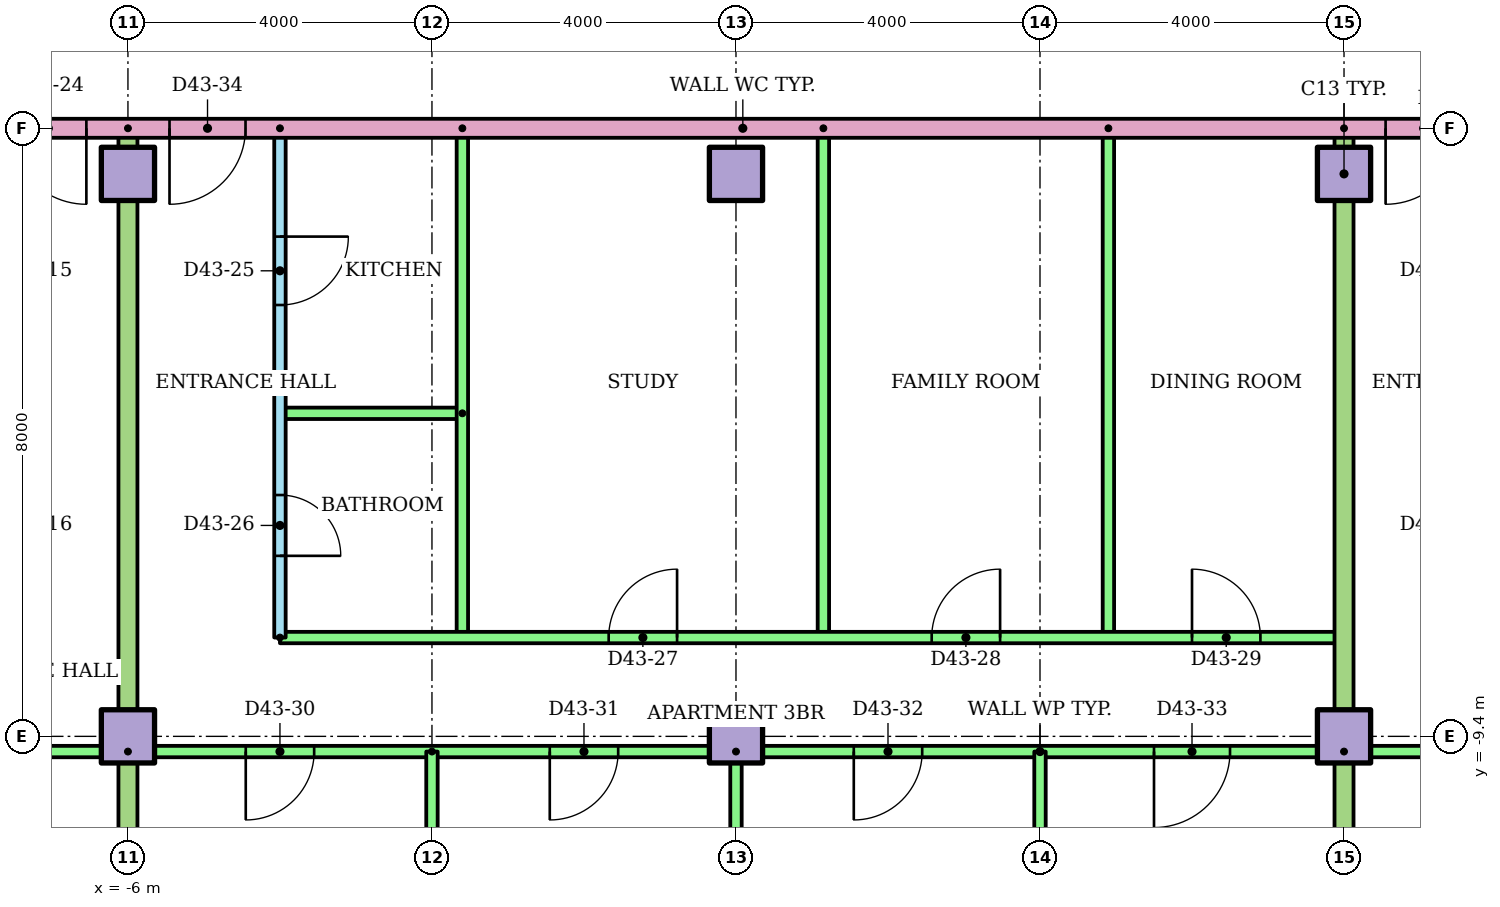
"""IFC4 building model, lengths in metres.
Left out: names, types, materials, properties, quantities, classifications, styles, units other than length and angle.
Written with IfcOpenShell. Run it as: python <this file> out.ifc"""

import sys

from ifc_helpers import new_model, si_unit, direction, frame, frame_2d, origin, origin_2d, place, context, subcontext, project, spatial, rectangle, extrude, element, fill, save


model = new_model("IFC4")
c1 = context("Model", 3, precision=1e-05, world=origin(), true_north=direction((0.0, 1.0)))
c2 = subcontext(c1, "Body", "Model", "MODEL_VIEW")
j1 = project(units=[si_unit("LENGTHUNIT", "METRE"), si_unit("PLANEANGLEUNIT", "RADIAN")], contexts=[c1])
p1 = place(None, origin())
s1 = spatial("IfcSite", under=j1, at=p1, CompositionType="ELEMENT")
p2 = place(p1, origin())
s2 = spatial("IfcBuilding", under=s1, at=p2, CompositionType="ELEMENT")
p3 = place(p2, frame((0.0, 0.0, 168.5)))
s3 = spatial("IfcBuildingStorey", under=s2, at=p3, CompositionType="ELEMENT", Elevation=168.5)
for number, where in (
    (1, (-6.0, -9.4, 0.0)),
    (2, (2.0, -9.4, 0.0)),
    (3, (10.0, -9.4, 0.0)),
    (4, (-6.0, -2.0, 0.0)),
    (5, (2.0, -2.0, 0.0)),
    (6, (10.0, -2.0, 0.0)),
):
    element("IfcColumn", number, at=place(p3, frame(where)), inside=s3, PredefinedType="COLUMN", context=c2, shape_type="SweptSolid", body=[
        extrude(rectangle(XDim=0.7, YDim=0.7, at=origin_2d()), origin(), (0.0, 0.0, 1.0), 3.2),
    ])
p4 = place(p3, frame((-6.0, -9.6, 0.0), z_axis=(0.0, 0.0, 1.0), x_axis=(-1.0, 0.0, 0.0)))
e7 = element("IfcWall", 7, at=p4, inside=s3, PredefinedType="PARTITIONING", context=c2, shape_type="SweptSolid", body=[
    extrude(rectangle(XDim=18.82, YDim=0.15, at=frame_2d((9.41, 0.0))), origin(), (0.0, 0.0, 1.0), 2.4),
])
p5 = place(p4, frame((16.547, 0.0, 0.0)))
e8 = element("IfcOpeningElement", 8, at=p5, cuts=e7, PredefinedType="OPENING", context=c2, shape_type="SweptSolid", body=[
    extrude(rectangle(XDim=0.9, YDim=2.1, at=frame_2d((0.45, 1.05))), frame((0.0, 0.085, 0.0), z_axis=(0.0, -1.0, 0.0), x_axis=(1.0, 0.0, 0.0)), (0.0, 0.0, 1.0), 0.17),
])
p6 = place(p4, frame((10.45, 0.0, 0.0)))
e9 = element("IfcOpeningElement", 9, at=p6, cuts=e7, PredefinedType="OPENING", context=c2, shape_type="SweptSolid", body=[
    extrude(rectangle(XDim=0.9, YDim=2.1, at=frame_2d((0.45, 1.05))), frame((0.0, 0.085, 0.0), z_axis=(0.0, -1.0, 0.0), x_axis=(1.0, 0.0, 0.0)), (0.0, 0.0, 1.0), 0.17),
])
p7 = place(p4, frame((3.5, 0.0, 0.0)))
e10 = element("IfcOpeningElement", 10, at=p7, cuts=e7, PredefinedType="OPENING", context=c2, shape_type="SweptSolid", body=[
    extrude(rectangle(XDim=1.0, YDim=2.1, at=frame_2d((0.5, 1.05))), frame((0.0, 0.085, 0.0), z_axis=(0.0, -1.0, 0.0), x_axis=(1.0, 0.0, 0.0)), (0.0, 0.0, 1.0), 0.17),
])
p8 = place(p3, frame((-4.0, -1.4, 0.0), z_axis=(0.0, 0.0, 1.0), x_axis=(0.0, -1.0, 0.0)))
e11 = element("IfcWall", 11, at=p8, inside=s3, PredefinedType="PARTITIONING", context=c2, shape_type="SweptSolid", body=[
    extrude(rectangle(XDim=6.7, YDim=0.15, at=frame_2d((3.35, 0.0))), origin(), (0.0, 0.0, 1.0), 2.4),
])
p9 = place(p8, frame((1.425, 0.0, 0.0)))
e12 = element("IfcOpeningElement", 12, at=p9, cuts=e11, PredefinedType="OPENING", context=c2, shape_type="SweptSolid", body=[
    extrude(rectangle(XDim=0.9, YDim=2.1, at=frame_2d((0.45, 1.05))), frame((0.0, 0.085, 0.0), z_axis=(0.0, -1.0, 0.0), x_axis=(1.0, 0.0, 0.0)), (0.0, 0.0, 1.0), 0.17),
])
p10 = place(p8, frame((4.825, 0.0, 0.0)))
e13 = element("IfcOpeningElement", 13, at=p10, cuts=e11, PredefinedType="OPENING", context=c2, shape_type="SweptSolid", body=[
    extrude(rectangle(XDim=0.8, YDim=2.1, at=frame_2d((0.4, 1.05))), frame((0.0, 0.085, 0.0), z_axis=(0.0, -1.0, 0.0), x_axis=(1.0, 0.0, 0.0)), (0.0, 0.0, 1.0), 0.17),
])
p11 = place(p3, frame((-1.6, -5.15, 0.0), z_axis=(0.0, 0.0, 1.0), x_axis=(-1.0, 0.0, 0.0)))
e14 = element("IfcWall", 14, at=p11, inside=s3, PredefinedType="PARTITIONING", context=c2, shape_type="SweptSolid", body=[
    extrude(rectangle(XDim=2.4, YDim=0.15, at=frame_2d((1.2, 0.0))), origin(), (0.0, 0.0, 1.0), 2.4),
])
for number, where, z_axis, x_axis in (
    (15, (-1.6, -1.4, 0.0), (0.0, 0.0, 1.0), (0.0, -1.0, 0.0)),
    (16, (3.15, -1.4, 0.0), (0.0, 0.0, 1.0), (0.0, -1.0, 0.0)),
    (17, (6.9, -1.4, 0.0), (0.0, 0.0, 1.0), (0.0, -1.0, 0.0)),
):
    element("IfcWall", number, at=place(p3, frame(where, z_axis=z_axis, x_axis=x_axis)), inside=s3, PredefinedType="PARTITIONING", context=c2, shape_type="SweptSolid", body=[
        extrude(rectangle(XDim=6.7, YDim=0.15, at=frame_2d((3.35, 0.0))), origin(), (0.0, 0.0, 1.0), 2.4),
    ])
p12 = place(p3, frame((-4.0, -8.1, 0.0)))
e18 = element("IfcWall", 18, at=p12, inside=s3, PredefinedType="PARTITIONING", context=c2, shape_type="SweptSolid", body=[
    extrude(rectangle(XDim=14.0, YDim=0.15, at=frame_2d((7.0, 0.0))), origin(), (0.0, 0.0, 1.0), 2.4),
])
p13 = place(p12, frame((4.325, 0.0, 0.0)))
e19 = element("IfcOpeningElement", 19, at=p13, cuts=e18, PredefinedType="OPENING", context=c2, shape_type="SweptSolid", body=[
    extrude(rectangle(XDim=0.9, YDim=2.1, at=frame_2d((0.45, 1.05))), frame((0.0, 0.085, 0.0), z_axis=(0.0, -1.0, 0.0), x_axis=(1.0, 0.0, 0.0)), (0.0, 0.0, 1.0), 0.17),
])
p14 = place(p12, frame((8.575, 0.0, 0.0)))
e20 = element("IfcOpeningElement", 20, at=p14, cuts=e18, PredefinedType="OPENING", context=c2, shape_type="SweptSolid", body=[
    extrude(rectangle(XDim=0.9, YDim=2.1, at=frame_2d((0.45, 1.05))), frame((0.0, 0.085, 0.0), z_axis=(0.0, -1.0, 0.0), x_axis=(1.0, 0.0, 0.0)), (0.0, 0.0, 1.0), 0.17),
])
p15 = place(p12, frame((12.0, 0.0, 0.0)))
e21 = element("IfcOpeningElement", 21, at=p15, cuts=e18, PredefinedType="OPENING", context=c2, shape_type="SweptSolid", body=[
    extrude(rectangle(XDim=0.9, YDim=2.1, at=frame_2d((0.45, 1.05))), frame((0.0, 0.085, 0.0), z_axis=(0.0, -1.0, 0.0), x_axis=(1.0, 0.0, 0.0)), (0.0, 0.0, 1.0), 0.17),
])
p16 = place(p3, frame((10.0, -9.6, 0.0), z_axis=(0.0, 0.0, 1.0), x_axis=(-1.0, 0.0, 0.0)))
e22 = element("IfcWall", 22, at=p16, inside=s3, PredefinedType="PARTITIONING", context=c2, shape_type="SweptSolid", body=[
    extrude(rectangle(XDim=16.0, YDim=0.15, at=frame_2d((8.0, 0.0))), origin(), (0.0, 0.0, 1.0), 2.4),
])
p17 = place(p16, frame((13.55, 0.0, 0.0)))
e23 = element("IfcOpeningElement", 23, at=p17, cuts=e22, PredefinedType="OPENING", context=c2, shape_type="SweptSolid", body=[
    extrude(rectangle(XDim=0.9, YDim=2.1, at=frame_2d((0.45, 1.05))), frame((0.0, 0.085, 0.0), z_axis=(0.0, -1.0, 0.0), x_axis=(1.0, 0.0, 0.0)), (0.0, 0.0, 1.0), 0.17),
])
p18 = place(p16, frame((9.55, 0.0, 0.0)))
e24 = element("IfcOpeningElement", 24, at=p18, cuts=e22, PredefinedType="OPENING", context=c2, shape_type="SweptSolid", body=[
    extrude(rectangle(XDim=0.9, YDim=2.1, at=frame_2d((0.45, 1.05))), frame((0.0, 0.085, 0.0), z_axis=(0.0, -1.0, 0.0), x_axis=(1.0, 0.0, 0.0)), (0.0, 0.0, 1.0), 0.17),
])
p19 = place(p16, frame((5.55, 0.0, 0.0)))
e25 = element("IfcOpeningElement", 25, at=p19, cuts=e22, PredefinedType="OPENING", context=c2, shape_type="SweptSolid", body=[
    extrude(rectangle(XDim=0.9, YDim=2.1, at=frame_2d((0.45, 1.05))), frame((0.0, 0.085, 0.0), z_axis=(0.0, -1.0, 0.0), x_axis=(1.0, 0.0, 0.0)), (0.0, 0.0, 1.0), 0.17),
])
p20 = place(p16, frame((1.5, 0.0, 0.0)))
e26 = element("IfcOpeningElement", 26, at=p20, cuts=e22, PredefinedType="OPENING", context=c2, shape_type="SweptSolid", body=[
    extrude(rectangle(XDim=1.0, YDim=2.1, at=frame_2d((0.5, 1.05))), frame((0.0, 0.085, 0.0), z_axis=(0.0, -1.0, 0.0), x_axis=(1.0, 0.0, 0.0)), (0.0, 0.0, 1.0), 0.17),
])
p21 = place(p3, frame((-2.0, -9.6, 0.0), z_axis=(0.0, 0.0, 1.0), x_axis=(0.0, -1.0, 0.0)))
e27 = element("IfcWall", 27, at=p21, inside=s3, PredefinedType="PARTITIONING", context=c2, shape_type="SweptSolid", body=[
    extrude(rectangle(XDim=6.821, YDim=0.15, at=frame_2d((3.41, 0.0))), origin(), (0.0, 0.0, 1.0), 2.4),
])
p22 = place(p3, frame((2.0, -9.6, 0.0), z_axis=(0.0, 0.0, 1.0), x_axis=(0.0, -1.0, 0.0)))
e28 = element("IfcWall", 28, at=p22, inside=s3, PredefinedType="PARTITIONING", context=c2, shape_type="SweptSolid", body=[
    extrude(rectangle(XDim=6.81, YDim=0.15, at=frame_2d((3.405, 0.0))), origin(), (0.0, 0.0, 1.0), 2.4),
])
p23 = place(p3, frame((6.0, -9.6, 0.0), z_axis=(0.0, 0.0, 1.0), x_axis=(0.0, -1.0, 0.0)))
e29 = element("IfcWall", 29, at=p23, inside=s3, PredefinedType="PARTITIONING", context=c2, shape_type="SweptSolid", body=[
    extrude(rectangle(XDim=6.821, YDim=0.15, at=frame_2d((3.41, 0.0))), origin(), (0.0, 0.0, 1.0), 2.4),
])
p24 = place(p3, frame((-6.0, -1.4, 0.0), z_axis=(0.0, 0.0, 1.0), x_axis=(0.0, -1.0, 0.0)))
e30 = element("IfcWall", 30, at=p24, inside=s3, PredefinedType="PARTITIONING", context=c2, shape_type="SweptSolid", body=[
    extrude(rectangle(XDim=15.01, YDim=0.25, at=frame_2d((7.505, 0.0))), origin(), (0.0, 0.0, 1.0), 2.4),
])
p25 = place(p3, frame((36.82, -9.6, 0.0), z_axis=(0.0, 0.0, 1.0), x_axis=(-1.0, 0.0, 0.0)))
e31 = element("IfcWall", 31, at=p25, inside=s3, PredefinedType="PARTITIONING", context=c2, shape_type="SweptSolid", body=[
    extrude(rectangle(XDim=26.82, YDim=0.15, at=frame_2d((13.41, 0.0))), origin(), (0.0, 0.0, 1.0), 2.4),
])
p26 = place(p25, frame((24.37, 0.0, 0.0)))
e32 = element("IfcOpeningElement", 32, at=p26, cuts=e31, PredefinedType="OPENING", context=c2, shape_type="SweptSolid", body=[
    extrude(rectangle(XDim=0.9, YDim=2.1, at=frame_2d((0.45, 1.05))), frame((0.0, 0.085, 0.0), z_axis=(0.0, -1.0, 0.0), x_axis=(1.0, 0.0, 0.0)), (0.0, 0.0, 1.0), 0.17),
])
p27 = place(p25, frame((20.37, 0.0, 0.0)))
e33 = element("IfcOpeningElement", 33, at=p27, cuts=e31, PredefinedType="OPENING", context=c2, shape_type="SweptSolid", body=[
    extrude(rectangle(XDim=0.9, YDim=2.1, at=frame_2d((0.45, 1.05))), frame((0.0, 0.085, 0.0), z_axis=(0.0, -1.0, 0.0), x_axis=(1.0, 0.0, 0.0)), (0.0, 0.0, 1.0), 0.17),
])
p28 = place(p25, frame((16.37, 0.0, 0.0)))
e34 = element("IfcOpeningElement", 34, at=p28, cuts=e31, PredefinedType="OPENING", context=c2, shape_type="SweptSolid", body=[
    extrude(rectangle(XDim=0.9, YDim=2.1, at=frame_2d((0.45, 1.05))), frame((0.0, 0.085, 0.0), z_axis=(0.0, -1.0, 0.0), x_axis=(1.0, 0.0, 0.0)), (0.0, 0.0, 1.0), 0.17),
])
p29 = place(p25, frame((9.27, 0.0, 0.0)))
e35 = element("IfcOpeningElement", 35, at=p29, cuts=e31, PredefinedType="OPENING", context=c2, shape_type="SweptSolid", body=[
    extrude(rectangle(XDim=1.0, YDim=2.1, at=frame_2d((0.5, 1.05))), frame((0.0, 0.085, 0.0), z_axis=(0.0, -1.0, 0.0), x_axis=(1.0, 0.0, 0.0)), (0.0, 0.0, 1.0), 0.17),
])
p30 = place(p25, frame((1.373, 0.0, 0.0)))
e36 = element("IfcOpeningElement", 36, at=p30, cuts=e31, PredefinedType="OPENING", context=c2, shape_type="SweptSolid", body=[
    extrude(rectangle(XDim=0.9, YDim=2.1, at=frame_2d((0.45, 1.05))), frame((0.0, 0.085, 0.0), z_axis=(0.0, -1.0, 0.0), x_axis=(1.0, 0.0, 0.0)), (0.0, 0.0, 1.0), 0.17),
])
p31 = place(p3, frame((10.0, -1.4, 0.0), z_axis=(0.0, 0.0, 1.0), x_axis=(0.0, -1.0, 0.0)))
e37 = element("IfcWall", 37, at=p31, inside=s3, PredefinedType="PARTITIONING", context=c2, shape_type="SweptSolid", body=[
    extrude(rectangle(XDim=15.01, YDim=0.25, at=frame_2d((7.505, 0.0))), origin(), (0.0, 0.0, 1.0), 2.4),
])
p32 = place(p3, frame((14.0, -1.4, 0.0), z_axis=(0.0, 0.0, 1.0), x_axis=(-1.0, 0.0, 0.0)))
e38 = element("IfcWall", 38, at=p32, inside=s3, PredefinedType="PARTITIONING", context=c2, shape_type="SweptSolid", body=[
    extrude(rectangle(XDim=28.0, YDim=0.25, at=frame_2d((14.0, 0.0))), origin(), (0.0, 0.0, 1.0), 2.4),
])
p33 = place(p32, frame((20.547, 0.0, 0.0)))
e39 = element("IfcOpeningElement", 39, at=p33, cuts=e38, PredefinedType="OPENING", context=c2, shape_type="SweptSolid", body=[
    extrude(rectangle(XDim=1.0, YDim=2.1, at=frame_2d((0.5, 1.05))), frame((0.0, 0.135, 0.0), z_axis=(0.0, -1.0, 0.0), x_axis=(1.0, 0.0, 0.0)), (0.0, 0.0, 1.0), 0.27),
])
p34 = place(p32, frame((18.453, 0.0, 0.0)))
e40 = element("IfcOpeningElement", 40, at=p34, cuts=e38, PredefinedType="OPENING", context=c2, shape_type="SweptSolid", body=[
    extrude(rectangle(XDim=1.0, YDim=2.1, at=frame_2d((0.5, 1.05))), frame((0.0, 0.135, 0.0), z_axis=(0.0, -1.0, 0.0), x_axis=(1.0, 0.0, 0.0)), (0.0, 0.0, 1.0), 0.27),
])
p35 = place(p32, frame((2.453, 0.0, 0.0)))
e41 = element("IfcOpeningElement", 41, at=p35, cuts=e38, PredefinedType="OPENING", context=c2, shape_type="SweptSolid", body=[
    extrude(rectangle(XDim=1.0, YDim=2.1, at=frame_2d((0.5, 1.05))), frame((0.0, 0.135, 0.0), z_axis=(0.0, -1.0, 0.0), x_axis=(1.0, 0.0, 0.0)), (0.0, 0.0, 1.0), 0.27),
])
p36 = place(p33, origin())
e42 = element("IfcDoor", 42, at=p36, inside=s3, OperationType="SINGLE_SWING_LEFT", PredefinedType="DOOR", context=c2, shape_type="SweptSolid", body=[
    extrude(rectangle(XDim=1.0, YDim=2.1, at=frame_2d((0.5, 1.05))), frame((0.0, 0.025, 0.0), z_axis=(0.0, -1.0, 0.0), x_axis=(1.0, 0.0, 0.0)), (0.0, 0.0, 1.0), 0.05),
])
fill(e39, e42)
p37 = place(p9, origin())
e43 = element("IfcDoor", 43, at=p37, inside=s3, OperationType="SINGLE_SWING_LEFT", PredefinedType="DOOR", context=c2, shape_type="SweptSolid", body=[
    extrude(rectangle(XDim=0.9, YDim=2.1, at=frame_2d((0.45, 1.05))), frame((0.0, 0.025, 0.0), z_axis=(0.0, -1.0, 0.0), x_axis=(1.0, 0.0, 0.0)), (0.0, 0.0, 1.0), 0.05),
])
fill(e12, e43)
p38 = place(p10, origin())
e44 = element("IfcDoor", 44, at=p38, inside=s3, OperationType="SINGLE_SWING_RIGHT", PredefinedType="DOOR", context=c2, shape_type="SweptSolid", body=[
    extrude(rectangle(XDim=0.8, YDim=2.1, at=frame_2d((0.4, 1.05))), frame((0.0, 0.025, 0.0), z_axis=(0.0, -1.0, 0.0), x_axis=(1.0, 0.0, 0.0)), (0.0, 0.0, 1.0), 0.05),
])
fill(e13, e44)
p39 = place(p13, origin())
e45 = element("IfcDoor", 45, at=p39, inside=s3, OperationType="SINGLE_SWING_RIGHT", PredefinedType="DOOR", context=c2, shape_type="SweptSolid", body=[
    extrude(rectangle(XDim=0.9, YDim=2.1, at=frame_2d((0.45, 1.05))), frame((0.0, 0.025, 0.0), z_axis=(0.0, -1.0, 0.0), x_axis=(1.0, 0.0, 0.0)), (0.0, 0.0, 1.0), 0.05),
])
fill(e19, e45)
p40 = place(p14, origin())
e46 = element("IfcDoor", 46, at=p40, inside=s3, OperationType="SINGLE_SWING_RIGHT", PredefinedType="DOOR", context=c2, shape_type="SweptSolid", body=[
    extrude(rectangle(XDim=0.9, YDim=2.1, at=frame_2d((0.45, 1.05))), frame((0.0, 0.025, 0.0), z_axis=(0.0, -1.0, 0.0), x_axis=(1.0, 0.0, 0.0)), (0.0, 0.0, 1.0), 0.05),
])
fill(e20, e46)
p41 = place(p15, origin())
e47 = element("IfcDoor", 47, at=p41, inside=s3, OperationType="SINGLE_SWING_LEFT", PredefinedType="DOOR", context=c2, shape_type="SweptSolid", body=[
    extrude(rectangle(XDim=0.9, YDim=2.1, at=frame_2d((0.45, 1.05))), frame((0.0, 0.025, 0.0), z_axis=(0.0, -1.0, 0.0), x_axis=(1.0, 0.0, 0.0)), (0.0, 0.0, 1.0), 0.05),
])
fill(e21, e47)
p42 = place(p17, origin())
e48 = element("IfcDoor", 48, at=p42, inside=s3, OperationType="SINGLE_SWING_RIGHT", PredefinedType="DOOR", context=c2, shape_type="SweptSolid", body=[
    extrude(rectangle(XDim=0.9, YDim=2.1, at=frame_2d((0.45, 1.05))), frame((0.0, 0.025, 0.0), z_axis=(0.0, -1.0, 0.0), x_axis=(1.0, 0.0, 0.0)), (0.0, 0.0, 1.0), 0.05),
])
fill(e23, e48)
p43 = place(p18, origin())
e49 = element("IfcDoor", 49, at=p43, inside=s3, OperationType="SINGLE_SWING_RIGHT", PredefinedType="DOOR", context=c2, shape_type="SweptSolid", body=[
    extrude(rectangle(XDim=0.9, YDim=2.1, at=frame_2d((0.45, 1.05))), frame((0.0, 0.025, 0.0), z_axis=(0.0, -1.0, 0.0), x_axis=(1.0, 0.0, 0.0)), (0.0, 0.0, 1.0), 0.05),
])
fill(e24, e49)
p44 = place(p19, origin())
e50 = element("IfcDoor", 50, at=p44, inside=s3, OperationType="SINGLE_SWING_RIGHT", PredefinedType="DOOR", context=c2, shape_type="SweptSolid", body=[
    extrude(rectangle(XDim=0.9, YDim=2.1, at=frame_2d((0.45, 1.05))), frame((0.0, 0.025, 0.0), z_axis=(0.0, -1.0, 0.0), x_axis=(1.0, 0.0, 0.0)), (0.0, 0.0, 1.0), 0.05),
])
fill(e25, e50)
p45 = place(p20, origin())
e51 = element("IfcDoor", 51, at=p45, inside=s3, OperationType="SINGLE_SWING_RIGHT", PredefinedType="DOOR", context=c2, shape_type="SweptSolid", body=[
    extrude(rectangle(XDim=1.0, YDim=2.1, at=frame_2d((0.5, 1.05))), frame((0.0, 0.025, 0.0), z_axis=(0.0, -1.0, 0.0), x_axis=(1.0, 0.0, 0.0)), (0.0, 0.0, 1.0), 0.05),
])
fill(e26, e51)
p46 = place(p34, origin())
e52 = element("IfcDoor", 52, at=p46, inside=s3, OperationType="SINGLE_SWING_RIGHT", PredefinedType="DOOR", context=c2, shape_type="SweptSolid", body=[
    extrude(rectangle(XDim=1.0, YDim=2.1, at=frame_2d((0.5, 1.05))), frame((0.0, 0.025, 0.0), z_axis=(0.0, -1.0, 0.0), x_axis=(1.0, 0.0, 0.0)), (0.0, 0.0, 1.0), 0.05),
])
fill(e40, e52)
p47 = place(p35, origin())
e53 = element("IfcDoor", 53, at=p47, inside=s3, OperationType="SINGLE_SWING_RIGHT", PredefinedType="DOOR", context=c2, shape_type="SweptSolid", body=[
    extrude(rectangle(XDim=1.0, YDim=2.1, at=frame_2d((0.5, 1.05))), frame((0.0, 0.025, 0.0), z_axis=(0.0, -1.0, 0.0), x_axis=(1.0, 0.0, 0.0)), (0.0, 0.0, 1.0), 0.05),
])
fill(e41, e53)
save(model, sys.argv[1])
